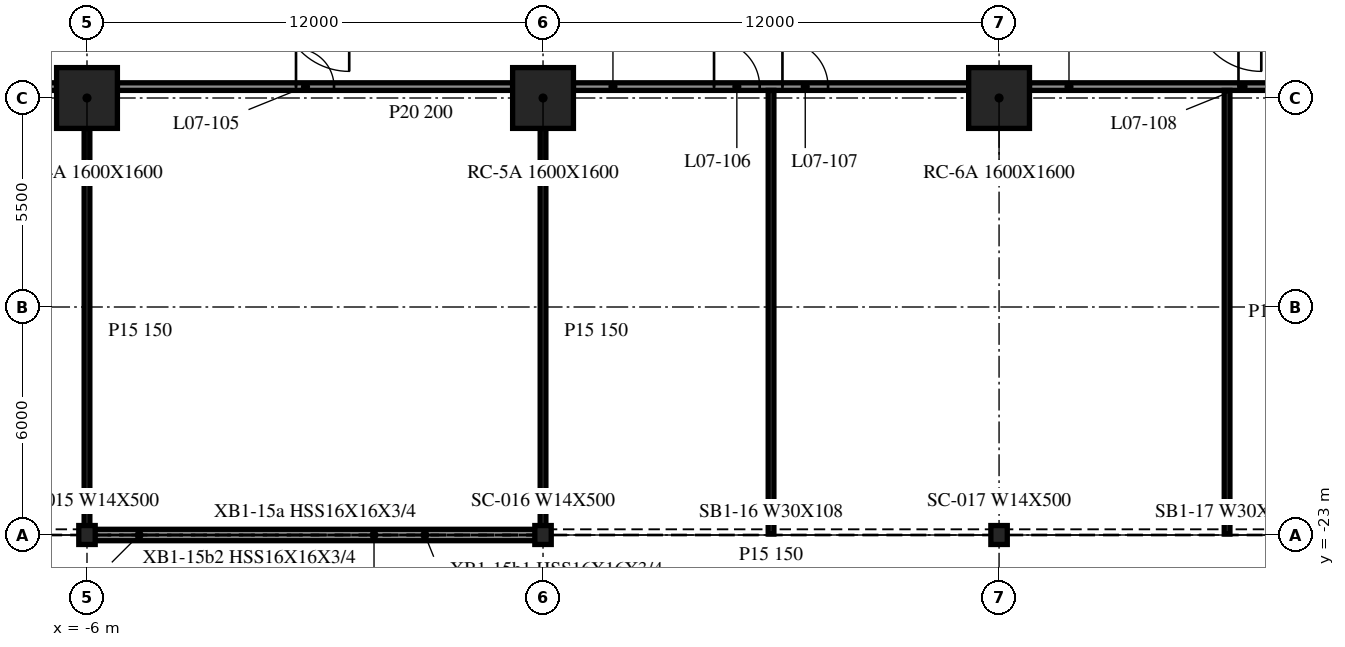
"""IFC4 building model, lengths in metres.
Left out: names, types, materials, properties, quantities, classifications, styles, units other than length and angle.
Written with IfcOpenShell. Run it as: python <this file> out.ifc"""

import sys

from ifc_helpers import new_model, si_unit, direction, frame, frame_2d, origin, origin_2d, place, context, subcontext, project, spatial, rectangle, i_section, extrude, element, fill, save


model = new_model("IFC4")
c1 = context("Model", 3, precision=1e-05, world=origin(), true_north=direction((0.0, 1.0)))
c2 = subcontext(c1, "Body", "Model", "MODEL_VIEW")
j1 = project(units=[si_unit("LENGTHUNIT", "METRE"), si_unit("PLANEANGLEUNIT", "RADIAN")], contexts=[c1])
p1 = place(None, origin())
s1 = spatial("IfcSite", under=j1, at=p1, CompositionType="ELEMENT")
p2 = place(p1, origin())
s2 = spatial("IfcBuilding", under=s1, at=p2, CompositionType="ELEMENT")
p3 = place(p2, frame((0.0, 0.0, 33.0)))
s3 = spatial("IfcBuildingStorey", under=s2, at=p3, CompositionType="ELEMENT", Elevation=33.0)
for number, where, z_axis, x_axis in (
    (1, (-6.0, -11.5, -0.34), (0.0, 0.0, 1.0), (1.0, 0.0, 0.0)),
    (2, (6.0, -11.5, -0.34), (0.0, 0.0, 1.0), (1.0, 0.0, 0.0)),
    (3, (18.0, -11.5, -0.34), (0.0, 0.0, 1.0), (1.0, 0.0, 0.0)),
):
    element("IfcColumn", number, at=place(p3, frame(where, z_axis=z_axis, x_axis=x_axis)), inside=s3, PredefinedType="COLUMN", context=c2, shape_type="SweptSolid", body=[
        extrude(rectangle(XDim=1.6, YDim=1.6, at=origin_2d()), origin(), (0.0, 0.0, 1.0), 4.3),
    ])
for number, where, z_axis, x_axis in (
    (4, (-6.0, -23.0, -0.34), (0.0, 0.0, 1.0), (1.0, 0.0, 0.0)),
    (5, (6.0, -23.0, -0.34), (0.0, 0.0, 1.0), (1.0, 0.0, 0.0)),
    (6, (18.0, -23.0, -0.34), (0.0, 0.0, 1.0), (1.0, 0.0, 0.0)),
):
    element("IfcColumn", number, at=place(p3, frame(where, z_axis=z_axis, x_axis=x_axis)), inside=s3, PredefinedType="COLUMN", context=c2, shape_type="SweptSolid", body=[
        extrude(i_section(OverallWidth=0.432, OverallDepth=0.498, WebThickness=0.056, FlangeThickness=0.089, at=origin_2d()), origin(), (0.0, 0.0, 1.0), 4.3),
    ])
p4 = place(p3, frame((-5.972, -23.0, 0.0), z_axis=(0.0, 0.0, 1.0), x_axis=(1.0, 0.0, 0.0)))
e7 = element("IfcWall", 7, at=p4, inside=s3, PredefinedType="NOTDEFINED", context=c2, shape_type="SweptSolid", body=[
    extrude(rectangle(XDim=11.944, YDim=0.3, at=frame_2d((5.972, 0.0))), origin(), (0.0, 0.0, 1.0), 3.203),
])
p5 = place(p3, frame((-17.2, -11.2, 0.0), z_axis=(0.0, 0.0, 1.0), x_axis=(1.0, 0.0, 0.0)))
e8 = element("IfcWall", 8, at=p5, inside=s3, PredefinedType="PARTITIONING", context=c2, shape_type="SweptSolid", body=[
    extrude(rectangle(XDim=10.4, YDim=0.2, at=frame_2d((5.2, 0.0))), origin(), (0.0, 0.0, 1.0), 3.96),
])
p6 = place(p5, frame((4.5, 0.0, 0.0)))
e9 = element("IfcOpeningElement", 9, at=p6, cuts=e8, PredefinedType="OPENING", context=c2, shape_type="SweptSolid", body=[
    extrude(rectangle(XDim=1.2, YDim=2.1, at=frame_2d((0.6, 1.05))), frame((0.0, 0.11, 0.0), z_axis=(0.0, -1.0, 0.0), x_axis=(1.0, 0.0, 0.0)), (0.0, 0.0, 1.0), 0.22),
])
p7 = place(p3, frame((-5.2, -11.2, 0.0), z_axis=(0.0, 0.0, 1.0), x_axis=(1.0, 0.0, 0.0)))
e10 = element("IfcWall", 10, at=p7, inside=s3, PredefinedType="PARTITIONING", context=c2, shape_type="SweptSolid", body=[
    extrude(rectangle(XDim=10.4, YDim=0.2, at=frame_2d((5.2, 0.0))), origin(), (0.0, 0.0, 1.0), 3.96),
])
p8 = place(p7, frame((4.7, 0.0, 0.0)))
e11 = element("IfcOpeningElement", 11, at=p8, cuts=e10, PredefinedType="OPENING", context=c2, shape_type="SweptSolid", body=[
    extrude(rectangle(XDim=1.0, YDim=2.1, at=frame_2d((0.5, 1.05))), frame((0.0, 0.11, 0.0), z_axis=(0.0, -1.0, 0.0), x_axis=(1.0, 0.0, 0.0)), (0.0, 0.0, 1.0), 0.22),
])
p9 = place(p3, frame((6.8, -11.2, 0.0), z_axis=(0.0, 0.0, 1.0), x_axis=(1.0, 0.0, 0.0)))
e12 = element("IfcWall", 12, at=p9, inside=s3, PredefinedType="PARTITIONING", context=c2, shape_type="SweptSolid", body=[
    extrude(rectangle(XDim=10.4, YDim=0.2, at=frame_2d((5.2, 0.0))), origin(), (0.0, 0.0, 1.0), 3.96),
])
p10 = place(p9, frame((3.7, 0.0, 0.0)))
e13 = element("IfcOpeningElement", 13, at=p10, cuts=e12, PredefinedType="OPENING", context=c2, shape_type="SweptSolid", body=[
    extrude(rectangle(XDim=1.2, YDim=2.1, at=frame_2d((0.6, 1.05))), frame((0.0, 0.11, 0.0), z_axis=(0.0, -1.0, 0.0), x_axis=(1.0, 0.0, 0.0)), (0.0, 0.0, 1.0), 0.22),
])
p11 = place(p9, frame((5.5, 0.0, 0.0)))
e14 = element("IfcOpeningElement", 14, at=p11, cuts=e12, PredefinedType="OPENING", context=c2, shape_type="SweptSolid", body=[
    extrude(rectangle(XDim=1.2, YDim=2.1, at=frame_2d((0.6, 1.05))), frame((0.0, 0.11, 0.0), z_axis=(0.0, -1.0, 0.0), x_axis=(1.0, 0.0, 0.0)), (0.0, 0.0, 1.0), 0.22),
])
p12 = place(p3, frame((18.8, -11.2, 0.0), z_axis=(0.0, 0.0, 1.0), x_axis=(1.0, 0.0, 0.0)))
e15 = element("IfcWall", 15, at=p12, inside=s3, PredefinedType="PARTITIONING", context=c2, shape_type="SweptSolid", body=[
    extrude(rectangle(XDim=10.4, YDim=0.2, at=frame_2d((5.2, 0.0))), origin(), (0.0, 0.0, 1.0), 3.96),
])
p13 = place(p12, frame((5.5, 0.0, 0.0)))
e16 = element("IfcOpeningElement", 16, at=p13, cuts=e15, PredefinedType="OPENING", context=c2, shape_type="SweptSolid", body=[
    extrude(rectangle(XDim=1.2, YDim=2.1, at=frame_2d((0.6, 1.05))), frame((0.0, 0.11, 0.0), z_axis=(0.0, -1.0, 0.0), x_axis=(1.0, 0.0, 0.0)), (0.0, 0.0, 1.0), 0.22),
])
for number, where, z_axis, x_axis in (
    (17, (-6.0, -22.975, 0.0), (0.0, 0.0, 1.0), (0.0, 1.0, 0.0)),
    (18, (6.0, -22.975, 0.0), (0.0, 0.0, 1.0), (0.0, 1.0, 0.0)),
):
    element("IfcWall", number, at=place(p3, frame(where, z_axis=z_axis, x_axis=x_axis)), inside=s3, PredefinedType="PARTITIONING", context=c2, shape_type="SweptSolid", body=[
        extrude(rectangle(XDim=10.675, YDim=0.15, at=frame_2d((5.337, 0.0))), origin(), (0.0, 0.0, 1.0), 3.96),
    ])
for number, where, z_axis, x_axis in (
    (19, (12.0, -22.975, 0.0), (0.0, 0.0, 1.0), (0.0, 1.0, 0.0)),
    (20, (24.0, -22.975, 0.0), (0.0, 0.0, 1.0), (0.0, 1.0, 0.0)),
):
    element("IfcWall", number, at=place(p3, frame(where, z_axis=z_axis, x_axis=x_axis)), inside=s3, PredefinedType="PARTITIONING", context=c2, shape_type="SweptSolid", body=[
        extrude(rectangle(XDim=11.675, YDim=0.15, at=frame_2d((5.837, 0.0))), origin(), (0.0, 0.0, 1.0), 3.96),
    ])
p14 = place(p8, origin())
e21 = element("IfcDoor", 21, at=p14, inside=s3, OperationType="SINGLE_SWING_RIGHT", PredefinedType="DOOR", context=c2, shape_type="SweptSolid", body=[
    extrude(rectangle(XDim=1.0, YDim=2.1, at=frame_2d((0.5, 1.05))), frame((0.0, 0.025, 0.0), z_axis=(0.0, -1.0, 0.0), x_axis=(1.0, 0.0, 0.0)), (0.0, 0.0, 1.0), 0.05),
])
fill(e11, e21)
p15 = place(p10, origin())
e22 = element("IfcDoor", 22, at=p15, inside=s3, OperationType="SINGLE_SWING_RIGHT", PredefinedType="DOOR", context=c2, shape_type="SweptSolid", body=[
    extrude(rectangle(XDim=1.2, YDim=2.1, at=frame_2d((0.6, 1.05))), frame((0.0, 0.025, 0.0), z_axis=(0.0, -1.0, 0.0), x_axis=(1.0, 0.0, 0.0)), (0.0, 0.0, 1.0), 0.05),
])
fill(e13, e22)
p16 = place(p11, origin())
e23 = element("IfcDoor", 23, at=p16, inside=s3, OperationType="SINGLE_SWING_LEFT", PredefinedType="DOOR", context=c2, shape_type="SweptSolid", body=[
    extrude(rectangle(XDim=1.2, YDim=2.1, at=frame_2d((0.6, 1.05))), frame((0.0, 0.025, 0.0), z_axis=(0.0, -1.0, 0.0), x_axis=(1.0, 0.0, 0.0)), (0.0, 0.0, 1.0), 0.05),
])
fill(e14, e23)
p17 = place(p13, origin())
e24 = element("IfcDoor", 24, at=p17, inside=s3, OperationType="SINGLE_SWING_LEFT", PredefinedType="DOOR", context=c2, shape_type="SweptSolid", body=[
    extrude(rectangle(XDim=1.2, YDim=2.1, at=frame_2d((0.6, 1.05))), frame((0.0, 0.025, 0.0), z_axis=(0.0, -1.0, 0.0), x_axis=(1.0, 0.0, 0.0)), (0.0, 0.0, 1.0), 0.05),
])
fill(e16, e24)
save(model, sys.argv[1])
